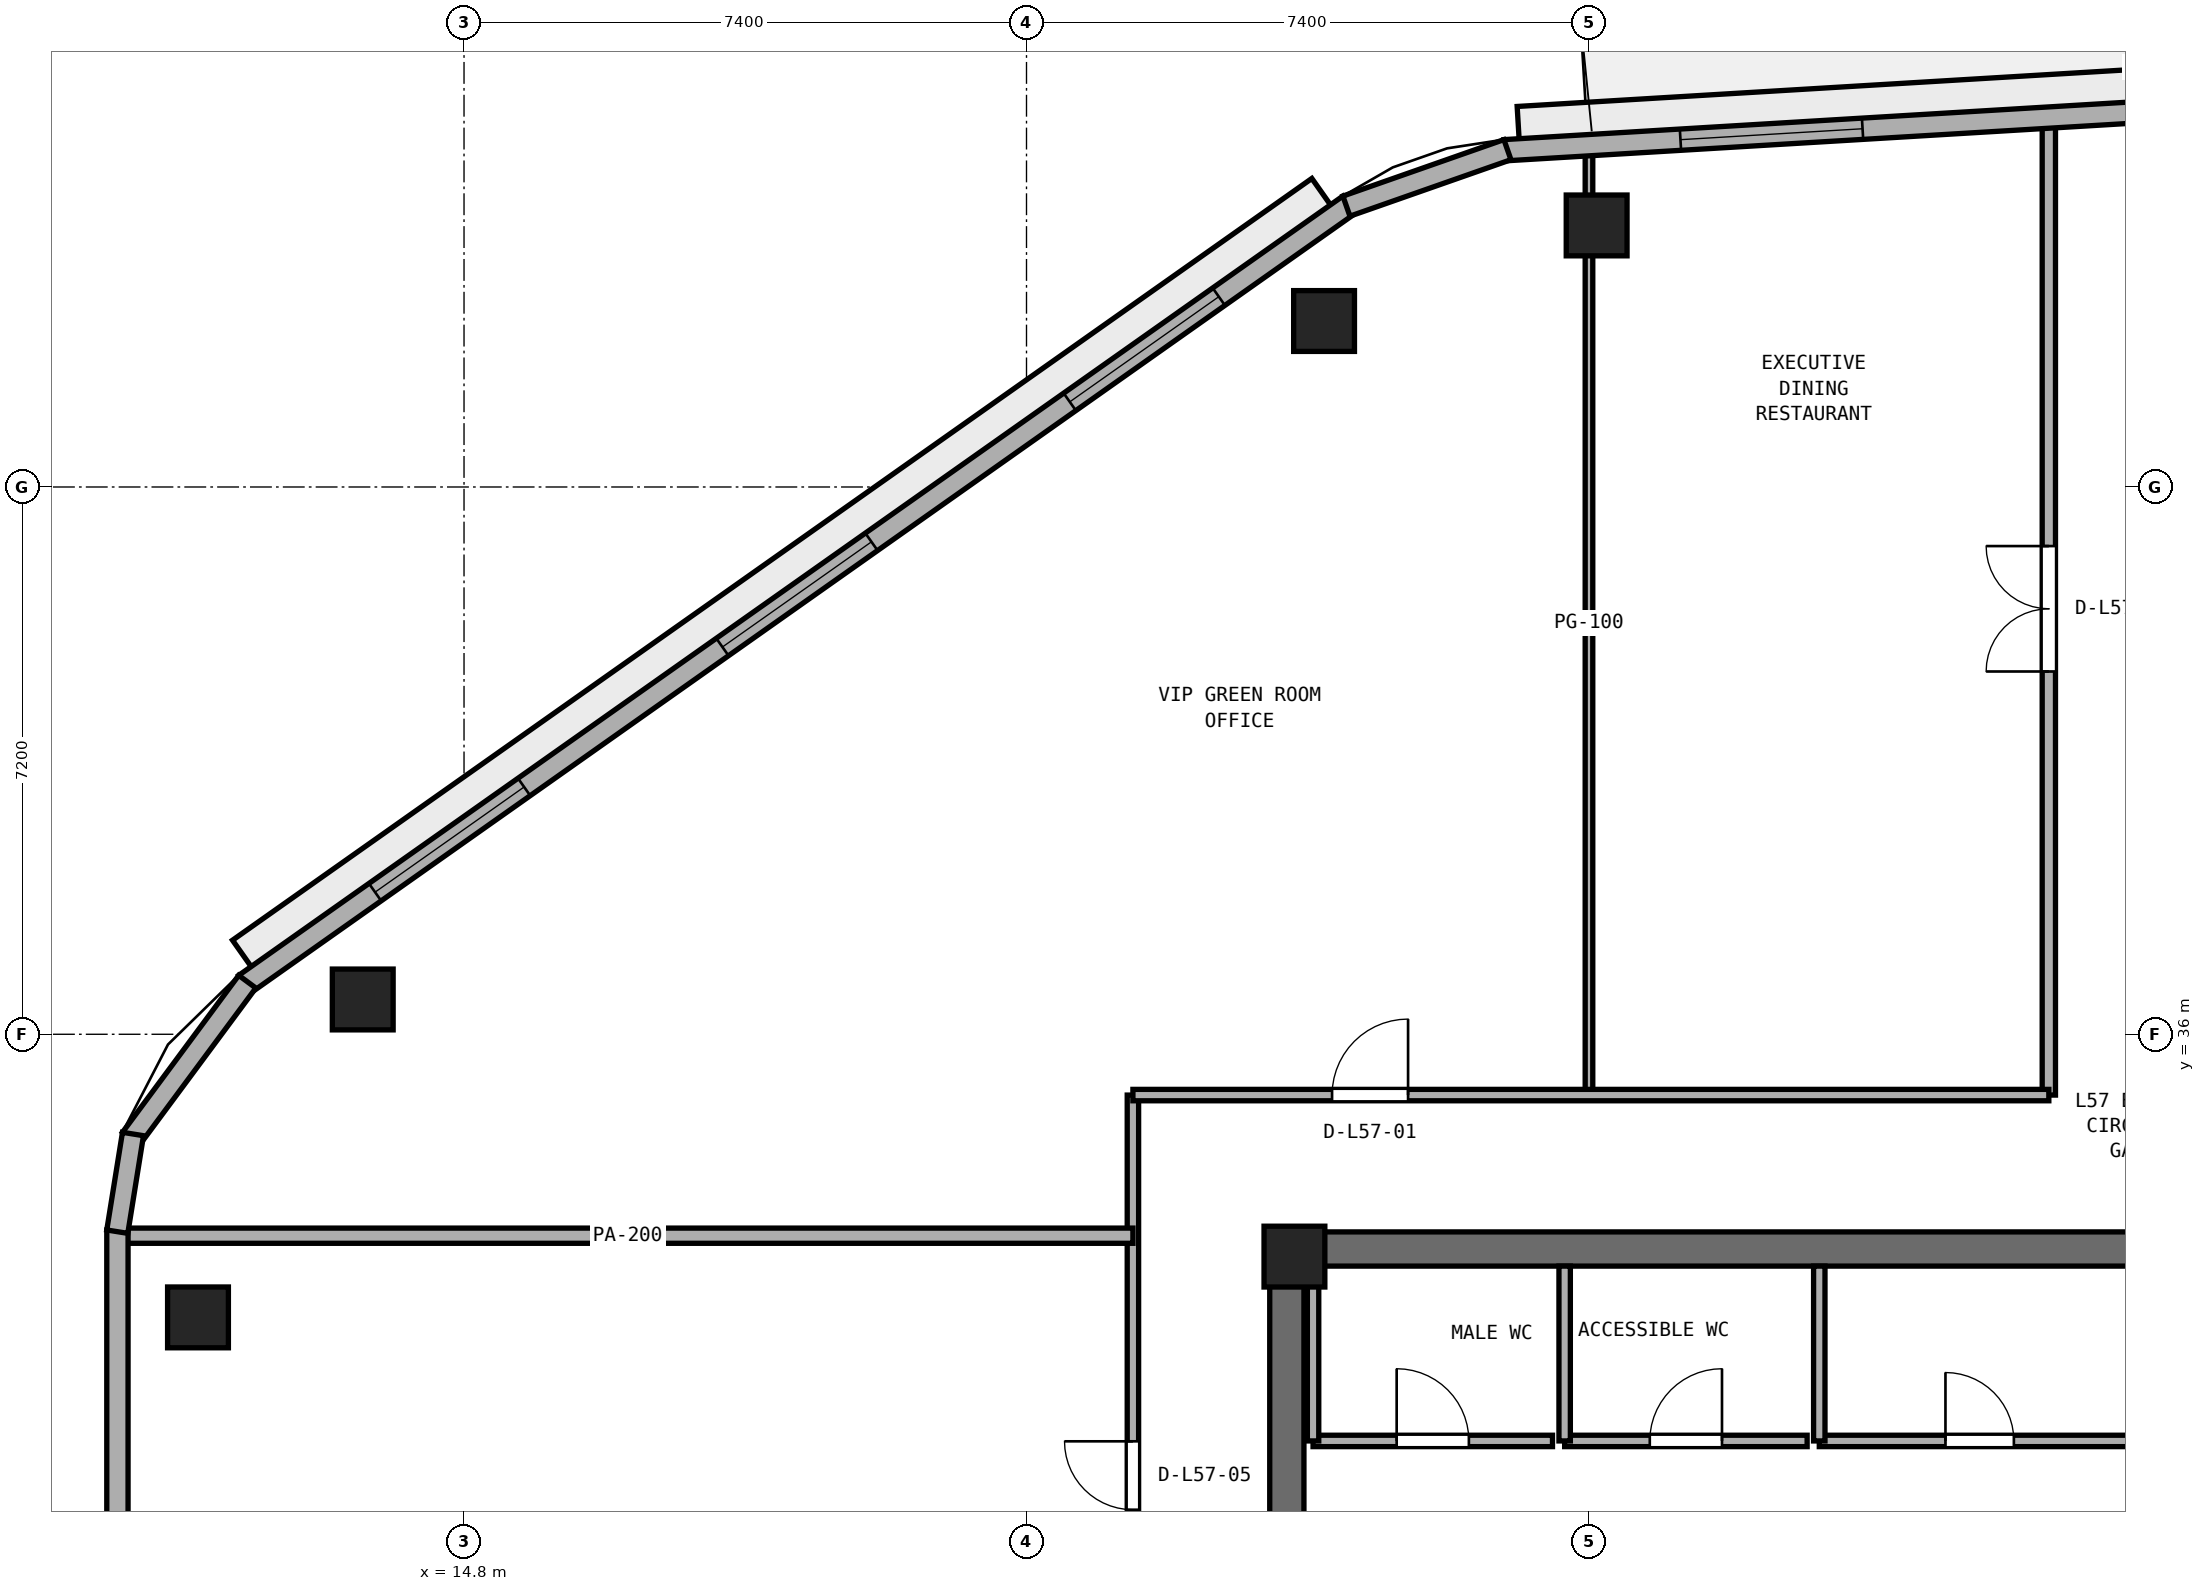
"""IFC4 building model, lengths in metres.
Left out: names, types, materials, properties, quantities, classifications, styles, units other than length and angle.
Written with IfcOpenShell. Run it as: python <this file> out.ifc"""

import sys

from ifc_helpers import new_model, si_unit, direction, frame, frame_2d, origin, origin_2d, place, context, subcontext, project, spatial, rectangle, extrude, element, fill, save


model = new_model("IFC4")
c1 = context("Model", 3, precision=1e-05, world=origin(), true_north=direction((0.0, 1.0)))
c2 = subcontext(c1, "Body", "Model", "MODEL_VIEW")
j1 = project(units=[si_unit("LENGTHUNIT", "METRE"), si_unit("PLANEANGLEUNIT", "RADIAN")], contexts=[c1])
p1 = place(None, origin())
s1 = spatial("IfcSite", under=j1, at=p1, CompositionType="ELEMENT")
p2 = place(p1, origin())
s2 = spatial("IfcBuilding", under=s1, at=p2, CompositionType="ELEMENT")
p3 = place(p2, frame((0.0, 0.0, 225.0)))
s3 = spatial("IfcBuildingStorey", under=s2, at=p3, CompositionType="ELEMENT", Elevation=225.0)
p4 = place(p3, frame((25.4, 33.175, 0.0), z_axis=(0.0, 0.0, 1.0), x_axis=(1.0, 0.0, 0.0)))
e1 = element("IfcWall", 1, at=p4, inside=s3, PredefinedType="SHEAR", context=c2, shape_type="SweptSolid", body=[
    extrude(rectangle(XDim=23.2, YDim=0.45, at=frame_2d((11.6, 0.0))), origin(), (0.0, 0.0, 1.0), 3.51),
])
p5 = place(p3, frame((25.625, 17.45, 0.0), z_axis=(0.0, 0.0, 1.0), x_axis=(0.0, 1.0, 0.0)))
e2 = element("IfcWall", 2, at=p5, inside=s3, PredefinedType="SHEAR", context=c2, shape_type="SweptSolid", body=[
    extrude(rectangle(XDim=15.5, YDim=0.45, at=frame_2d((7.75, 0.0))), origin(), (0.0, 0.0, 1.0), 3.51),
])
p6 = place(p5, frame((7.0, 0.0, 0.0)))
e3 = element("IfcOpeningElement", 3, at=p6, cuts=e2, PredefinedType="OPENING", context=c2, shape_type="SweptSolid", body=[
    extrude(rectangle(XDim=1.5, YDim=2.15, at=frame_2d((0.75, 1.075))), frame((0.0, 0.235, 0.0), z_axis=(0.0, -1.0, 0.0), x_axis=(1.0, 0.0, 0.0)), (0.0, 0.0, 1.0), 0.47),
])
p7 = place(p3, frame((25.725, 33.075, 0.0), z_axis=(0.0, 0.0, 1.0), x_axis=(1.0, 0.0, 0.0)))
e4 = element("IfcColumn", 4, at=p7, inside=s3, PredefinedType="PILASTER", context=c2, shape_type="SweptSolid", body=[
    extrude(rectangle(XDim=0.8, YDim=0.8, at=origin_2d()), origin(), (0.0, 0.0, 1.0), 3.8),
])
for number, where, z_axis, x_axis in (
    (5, (29.701, 46.641, 0.0), (0.0, 0.0, 1.0), (1.0, 0.0, 0.0)),
    (6, (26.115, 45.384, 0.0), (0.0, 0.0, 1.0), (1.0, 0.0, 0.0)),
    (7, (13.467, 36.458, 0.0), (0.0, 0.0, 1.0), (1.0, 0.0, 0.0)),
    (8, (11.3, 32.275, 0.0), (0.0, 0.0, 1.0), (1.0, 0.0, 0.0)),
):
    element("IfcColumn", number, at=place(p3, frame(where, z_axis=z_axis, x_axis=x_axis)), inside=s3, PredefinedType="COLUMN", context=c2, shape_type="SweptSolid", body=[
        extrude(rectangle(XDim=0.8, YDim=0.8, at=origin_2d()), origin(), (0.0, 0.0, 1.0), 3.8),
    ])
p8 = place(p3, frame((25.97, 30.65, 0.0), z_axis=(0.0, 0.0, 1.0), x_axis=(1.0, 0.0, 0.0)))
e9 = element("IfcWall", 9, at=p8, inside=s3, PredefinedType="PARTITIONING", context=c2, shape_type="SweptSolid", body=[
    extrude(rectangle(XDim=3.15, YDim=0.15, at=frame_2d((1.575, 0.0))), origin(), (0.0, 0.0, 1.0), 3.51),
])
p9 = place(p8, frame((1.1, 0.0, 0.0)))
e10 = element("IfcOpeningElement", 10, at=p9, cuts=e9, PredefinedType="OPENING", context=c2, shape_type="SweptSolid", body=[
    extrude(rectangle(XDim=0.95, YDim=2.1, at=frame_2d((0.475, 1.05))), frame((0.0, 0.085, 0.0), z_axis=(0.0, -1.0, 0.0), x_axis=(1.0, 0.0, 0.0)), (0.0, 0.0, 1.0), 0.17),
])
p10 = place(p3, frame((25.97, 30.65, 0.0), z_axis=(0.0, 0.0, 1.0), x_axis=(0.0, 1.0, 0.0)))
e11 = element("IfcWall", 11, at=p10, inside=s3, PredefinedType="PARTITIONING", context=c2, shape_type="SweptSolid", body=[
    extrude(rectangle(XDim=2.3, YDim=0.15, at=frame_2d((1.15, 0.0))), origin(), (0.0, 0.0, 1.0), 2.61),
])
p11 = place(p3, frame((29.28, 30.65, 0.0), z_axis=(0.0, 0.0, 1.0), x_axis=(1.0, 0.0, 0.0)))
e12 = element("IfcWall", 12, at=p11, inside=s3, PredefinedType="PARTITIONING", context=c2, shape_type="SweptSolid", body=[
    extrude(rectangle(XDim=3.19, YDim=0.15, at=frame_2d((1.595, 0.0))), origin(), (0.0, 0.0, 1.0), 3.51),
])
p12 = place(p11, frame((1.12, 0.0, 0.0)))
e13 = element("IfcOpeningElement", 13, at=p12, cuts=e12, PredefinedType="OPENING", context=c2, shape_type="SweptSolid", body=[
    extrude(rectangle(XDim=0.95, YDim=2.1, at=frame_2d((0.475, 1.05))), frame((0.0, 0.085, 0.0), z_axis=(0.0, -1.0, 0.0), x_axis=(1.0, 0.0, 0.0)), (0.0, 0.0, 1.0), 0.17),
])
p13 = place(p3, frame((29.28, 30.65, 0.0), z_axis=(0.0, 0.0, 1.0), x_axis=(0.0, 1.0, 0.0)))
e14 = element("IfcWall", 14, at=p13, inside=s3, PredefinedType="PARTITIONING", context=c2, shape_type="SweptSolid", body=[
    extrude(rectangle(XDim=2.3, YDim=0.15, at=frame_2d((1.15, 0.0))), origin(), (0.0, 0.0, 1.0), 3.51),
])
p14 = place(p3, frame((32.63, 30.65, 0.0), z_axis=(0.0, 0.0, 1.0), x_axis=(1.0, 0.0, 0.0)))
e15 = element("IfcWall", 15, at=p14, inside=s3, PredefinedType="PARTITIONING", context=c2, shape_type="SweptSolid", body=[
    extrude(rectangle(XDim=4.22, YDim=0.15, at=frame_2d((2.11, 0.0))), origin(), (0.0, 0.0, 1.0), 3.51),
])
p15 = place(p14, frame((1.66, 0.0, 0.0)))
e16 = element("IfcOpeningElement", 16, at=p15, cuts=e15, PredefinedType="OPENING", context=c2, shape_type="SweptSolid", body=[
    extrude(rectangle(XDim=0.9, YDim=2.1, at=frame_2d((0.45, 1.05))), frame((0.0, 0.085, 0.0), z_axis=(0.0, -1.0, 0.0), x_axis=(1.0, 0.0, 0.0)), (0.0, 0.0, 1.0), 0.17),
])
p16 = place(p3, frame((32.63, 30.65, 0.0), z_axis=(0.0, 0.0, 1.0), x_axis=(0.0, 1.0, 0.0)))
e17 = element("IfcWall", 17, at=p16, inside=s3, PredefinedType="PARTITIONING", context=c2, shape_type="SweptSolid", body=[
    extrude(rectangle(XDim=2.3, YDim=0.15, at=frame_2d((1.15, 0.0))), origin(), (0.0, 0.0, 1.0), 3.51),
])
p17 = place(p3, frame((35.65, 35.2, 0.0), z_axis=(0.0, 0.0, 1.0), x_axis=(0.0, 1.0, 0.0)))
e18 = element("IfcWall", 18, at=p17, inside=s3, PredefinedType="PARTITIONING", context=c2, shape_type="SweptSolid", body=[
    extrude(rectangle(XDim=12.795, YDim=0.175, at=frame_2d((6.398, 0.0))), origin(), (0.0, 0.0, 1.0), 3.51),
])
p18 = place(p17, frame((5.573, 0.0, 0.0)))
e19 = element("IfcOpeningElement", 19, at=p18, cuts=e18, PredefinedType="OPENING", context=c2, shape_type="SweptSolid", body=[
    extrude(rectangle(XDim=1.65, YDim=2.15, at=frame_2d((0.825, 1.075))), frame((0.0, 0.097, 0.0), z_axis=(0.0, -1.0, 0.0), x_axis=(1.0, 0.0, 0.0)), (0.0, 0.0, 1.0), 0.195),
])
p19 = place(p3, frame((29.6, 35.2, 0.0), z_axis=(0.0, 0.0, 1.0), x_axis=(0.0, 1.0, 0.0)))
e20 = element("IfcWall", 20, at=p19, inside=s3, PredefinedType="PARTITIONING", context=c2, shape_type="SweptSolid", body=[
    extrude(rectangle(XDim=12.432, YDim=0.1, at=frame_2d((6.216, 0.0))), origin(), (0.0, 0.0, 1.0), 2.893),
])
p20 = place(p3, frame((23.6, 26.8, 0.0), z_axis=(0.0, 0.0, 1.0), x_axis=(0.0, 1.0, 0.0)))
e21 = element("IfcWall", 21, at=p20, inside=s3, PredefinedType="PARTITIONING", context=c2, shape_type="SweptSolid", body=[
    extrude(rectangle(XDim=8.4, YDim=0.15, at=frame_2d((4.2, 0.0))), origin(), (0.0, 0.0, 1.0), 3.51),
])
p21 = place(p20, frame((2.945, 0.0, 0.0)))
e22 = element("IfcOpeningElement", 22, at=p21, cuts=e21, PredefinedType="OPENING", context=c2, shape_type="SweptSolid", body=[
    extrude(rectangle(XDim=0.9, YDim=2.1, at=frame_2d((0.45, 1.05))), frame((0.0, 0.085, 0.0), z_axis=(0.0, -1.0, 0.0), x_axis=(1.0, 0.0, 0.0)), (0.0, 0.0, 1.0), 0.17),
])
p22 = place(p3, frame((10.305, 33.35, 0.0), z_axis=(0.0, 0.0, 1.0), x_axis=(1.0, 0.0, 0.0)))
e23 = element("IfcWall", 23, at=p22, inside=s3, PredefinedType="PARTITIONING", context=c2, shape_type="SweptSolid", body=[
    extrude(rectangle(XDim=13.295, YDim=0.2, at=frame_2d((6.647, 0.0))), origin(), (0.0, 0.0, 1.0), 3.51),
])
p23 = place(p3, frame((23.6, 35.2, 0.0), z_axis=(0.0, 0.0, 1.0), x_axis=(1.0, 0.0, 0.0)))
e24 = element("IfcWall", 24, at=p23, inside=s3, PredefinedType="PARTITIONING", context=c2, shape_type="SweptSolid", body=[
    extrude(rectangle(XDim=12.05, YDim=0.15, at=frame_2d((6.025, 0.0))), origin(), (0.0, 0.0, 1.0), 3.51),
])
p24 = place(p23, frame((2.62, 0.0, 0.0)))
e25 = element("IfcOpeningElement", 25, at=p24, cuts=e24, PredefinedType="OPENING", context=c2, shape_type="SweptSolid", body=[
    extrude(rectangle(XDim=1.0, YDim=2.12, at=frame_2d((0.5, 1.06))), frame((0.0, 0.085, 0.0), z_axis=(0.0, -1.0, 0.0), x_axis=(1.0, 0.0, 0.0)), (0.0, 0.0, 1.0), 0.17),
])
p25 = place(p3, frame((47.566, 48.775, 0.0), z_axis=(0.0, 0.0, 1.0), x_axis=(-0.998202767485, -0.059926913695, 0.0)))
e26 = element("IfcWall", 26, at=p25, inside=s3, PredefinedType="STANDARD", context=c2, shape_type="SweptSolid", body=[
    extrude(rectangle(XDim=19.111, YDim=0.28, at=frame_2d((9.556, 0.0))), origin(), (0.0, 0.0, 1.0), 3.51),
])
p26 = place(p25, frame((9.656, 0.0, 0.0)))
e27 = element("IfcOpeningElement", 27, at=p26, cuts=e26, PredefinedType="OPENING", context=c2, shape_type="SweptSolid", body=[
    extrude(rectangle(XDim=1.1, YDim=2.2, at=frame_2d((0.55, 1.1))), frame((0.0, 0.15, 0.0), z_axis=(0.0, -1.0, 0.0), x_axis=(1.0, 0.0, 0.0)), (0.0, 0.0, 1.0), 0.3),
])
p27 = place(p25, frame((2.319, 0.0, 0.9)))
e28 = element("IfcOpeningElement", 28, at=p27, cuts=e26, PredefinedType="OPENING", context=c2, shape_type="SweptSolid", body=[
    extrude(rectangle(XDim=2.4, YDim=1.75, at=frame_2d((1.2, 0.875))), frame((0.0, 0.15, 0.0), z_axis=(0.0, -1.0, 0.0), x_axis=(1.0, 0.0, 0.0)), (0.0, 0.0, 1.0), 0.3),
])
p28 = place(p25, frame((14.392, 0.0, 0.9)))
e29 = element("IfcOpeningElement", 29, at=p28, cuts=e26, PredefinedType="OPENING", context=c2, shape_type="SweptSolid", body=[
    extrude(rectangle(XDim=2.4, YDim=1.75, at=frame_2d((1.2, 0.875))), frame((0.0, 0.15, 0.0), z_axis=(0.0, -1.0, 0.0), x_axis=(1.0, 0.0, 0.0)), (0.0, 0.0, 1.0), 0.3),
])
p29 = place(p3, frame((26.443, 46.913, 0.0), z_axis=(0.0, 0.0, 1.0), x_axis=(-0.817024179766, -0.576603407619, 0.0)))
e30 = element("IfcWall", 30, at=p29, inside=s3, PredefinedType="STANDARD", context=c2, shape_type="SweptSolid", body=[
    extrude(rectangle(XDim=17.78, YDim=0.28, at=frame_2d((8.89, 0.0))), origin(), (0.0, 0.0, 1.0), 3.51),
])
p30 = place(p29, frame((2.097, 0.0, 0.9)))
e31 = element("IfcOpeningElement", 31, at=p30, cuts=e30, PredefinedType="OPENING", context=c2, shape_type="SweptSolid", body=[
    extrude(rectangle(XDim=2.4, YDim=1.75, at=frame_2d((1.2, 0.875))), frame((0.0, 0.15, 0.0), z_axis=(0.0, -1.0, 0.0), x_axis=(1.0, 0.0, 0.0)), (0.0, 0.0, 1.0), 0.3),
])
p31 = place(p29, frame((7.69, 0.0, 0.9)))
e32 = element("IfcOpeningElement", 32, at=p31, cuts=e30, PredefinedType="OPENING", context=c2, shape_type="SweptSolid", body=[
    extrude(rectangle(XDim=2.4, YDim=1.75, at=frame_2d((1.2, 0.875))), frame((0.0, 0.15, 0.0), z_axis=(0.0, -1.0, 0.0), x_axis=(1.0, 0.0, 0.0)), (0.0, 0.0, 1.0), 0.3),
])
p32 = place(p29, frame((13.283, 0.0, 0.9)))
e33 = element("IfcOpeningElement", 33, at=p32, cuts=e30, PredefinedType="OPENING", context=c2, shape_type="SweptSolid", body=[
    extrude(rectangle(XDim=2.4, YDim=1.75, at=frame_2d((1.2, 0.875))), frame((0.0, 0.15, 0.0), z_axis=(0.0, -1.0, 0.0), x_axis=(1.0, 0.0, 0.0)), (0.0, 0.0, 1.0), 0.3),
])
p33 = place(p3, frame((10.24, 33.425, 0.0), z_axis=(0.0, 0.0, 1.0), x_axis=(0.0, -1.0, 0.0)))
e34 = element("IfcWall", 34, at=p33, inside=s3, PredefinedType="STANDARD", context=c2, shape_type="SweptSolid", body=[
    extrude(rectangle(XDim=5.155, YDim=0.28, at=frame_2d((2.578, 0.0))), origin(), (0.0, 0.0, 1.0), 3.51),
])
p34 = place(p3, frame((28.527, 47.638, 0.0), z_axis=(0.0, 0.0, 1.0), x_axis=(-0.943686979207, -0.330839667022, 0.0)))
e35 = element("IfcWall", 35, at=p34, inside=s3, PredefinedType="STANDARD", context=c2, shape_type="SweptSolid", body=[
    extrude(rectangle(XDim=2.245, YDim=0.28, at=frame_2d((1.123, 0.0))), origin(), (0.0, 0.0, 1.0), 3.51),
])
p35 = place(p3, frame((11.948, 36.692, 0.0), z_axis=(0.0, 0.0, 1.0), x_axis=(-0.595170751493, -0.803599263668, 0.0)))
e36 = element("IfcWall", 36, at=p35, inside=s3, PredefinedType="STANDARD", context=c2, shape_type="SweptSolid", body=[
    extrude(rectangle(XDim=2.57, YDim=0.28, at=frame_2d((1.285, 0.0))), origin(), (0.0, 0.0, 1.0), 3.51),
])
p36 = place(p3, frame((10.445, 34.688, 0.0), z_axis=(0.0, 0.0, 1.0), x_axis=(-0.158524605336, -0.987355027081, 0.0)))
e37 = element("IfcWall", 37, at=p36, inside=s3, PredefinedType="STANDARD", context=c2, shape_type="SweptSolid", body=[
    extrude(rectangle(XDim=1.301, YDim=0.28, at=frame_2d((0.651, 0.0))), origin(), (0.0, 0.0, 1.0), 3.51),
])
p37 = place(p9, origin())
e38 = element("IfcDoor", 38, at=p37, inside=s3, OperationType="SINGLE_SWING_LEFT", PredefinedType="DOOR", context=c2, shape_type="SweptSolid", body=[
    extrude(rectangle(XDim=0.95, YDim=2.1, at=frame_2d((0.475, 1.05))), frame((0.0, 0.025, 0.0), z_axis=(0.0, -1.0, 0.0), x_axis=(1.0, 0.0, 0.0)), (0.0, 0.0, 1.0), 0.05),
])
fill(e10, e38)
p38 = place(p12, origin())
e39 = element("IfcDoor", 39, at=p38, inside=s3, OperationType="SINGLE_SWING_RIGHT", PredefinedType="DOOR", context=c2, shape_type="SweptSolid", body=[
    extrude(rectangle(XDim=0.95, YDim=2.1, at=frame_2d((0.475, 1.05))), frame((0.0, 0.025, 0.0), z_axis=(0.0, -1.0, 0.0), x_axis=(1.0, 0.0, 0.0)), (0.0, 0.0, 1.0), 0.05),
])
fill(e13, e39)
p39 = place(p15, origin())
e40 = element("IfcDoor", 40, at=p39, inside=s3, OperationType="SINGLE_SWING_LEFT", PredefinedType="DOOR", context=c2, shape_type="SweptSolid", body=[
    extrude(rectangle(XDim=0.9, YDim=2.1, at=frame_2d((0.45, 1.05))), frame((0.0, 0.025, 0.0), z_axis=(0.0, -1.0, 0.0), x_axis=(1.0, 0.0, 0.0)), (0.0, 0.0, 1.0), 0.05),
])
fill(e16, e40)
p40 = place(p24, origin())
e41 = element("IfcDoor", 41, at=p40, inside=s3, OperationType="SINGLE_SWING_RIGHT", PredefinedType="DOOR", context=c2, shape_type="SweptSolid", body=[
    extrude(rectangle(XDim=1.0, YDim=2.12, at=frame_2d((0.5, 1.06))), frame((0.0, 0.025, 0.0), z_axis=(0.0, -1.0, 0.0), x_axis=(1.0, 0.0, 0.0)), (0.0, 0.0, 1.0), 0.05),
])
fill(e25, e41)
p41 = place(p18, origin())
e42 = element("IfcDoor", 42, at=p41, inside=s3, OperationType="DOUBLE_DOOR_SINGLE_SWING", PredefinedType="DOOR", context=c2, shape_type="SweptSolid", body=[
    extrude(rectangle(XDim=1.65, YDim=2.15, at=frame_2d((0.825, 1.075))), frame((0.0, 0.025, 0.0), z_axis=(0.0, -1.0, 0.0), x_axis=(1.0, 0.0, 0.0)), (0.0, 0.0, 1.0), 0.05),
])
fill(e19, e42)
p42 = place(p21, origin())
e43 = element("IfcDoor", 43, at=p42, inside=s3, OperationType="SINGLE_SWING_RIGHT", PredefinedType="DOOR", context=c2, shape_type="SweptSolid", body=[
    extrude(rectangle(XDim=0.9, YDim=2.1, at=frame_2d((0.45, 1.05))), frame((0.0, 0.025, 0.0), z_axis=(0.0, -1.0, 0.0), x_axis=(1.0, 0.0, 0.0)), (0.0, 0.0, 1.0), 0.05),
])
fill(e22, e43)
p43 = place(p28, origin())
e44 = element("IfcWindow", 44, at=p43, inside=s3, PartitioningType="SINGLE_PANEL", PredefinedType="WINDOW", context=c2, shape_type="SweptSolid", body=[
    extrude(rectangle(XDim=2.4, YDim=1.75, at=frame_2d((1.2, 0.875))), frame((0.0, 0.03, 0.0), z_axis=(0.0, -1.0, 0.0), x_axis=(1.0, 0.0, 0.0)), (0.0, 0.0, 1.0), 0.06),
])
fill(e29, e44)
p44 = place(p30, origin())
e45 = element("IfcWindow", 45, at=p44, inside=s3, PartitioningType="SINGLE_PANEL", PredefinedType="WINDOW", context=c2, shape_type="SweptSolid", body=[
    extrude(rectangle(XDim=2.4, YDim=1.75, at=frame_2d((1.2, 0.875))), frame((0.0, 0.03, 0.0), z_axis=(0.0, -1.0, 0.0), x_axis=(1.0, 0.0, 0.0)), (0.0, 0.0, 1.0), 0.06),
])
fill(e31, e45)
p45 = place(p31, origin())
e46 = element("IfcWindow", 46, at=p45, inside=s3, PartitioningType="SINGLE_PANEL", PredefinedType="WINDOW", context=c2, shape_type="SweptSolid", body=[
    extrude(rectangle(XDim=2.4, YDim=1.75, at=frame_2d((1.2, 0.875))), frame((0.0, 0.03, 0.0), z_axis=(0.0, -1.0, 0.0), x_axis=(1.0, 0.0, 0.0)), (0.0, 0.0, 1.0), 0.06),
])
fill(e32, e46)
p46 = place(p32, origin())
e47 = element("IfcWindow", 47, at=p46, inside=s3, PartitioningType="SINGLE_PANEL", PredefinedType="WINDOW", context=c2, shape_type="SweptSolid", body=[
    extrude(rectangle(XDim=2.4, YDim=1.75, at=frame_2d((1.2, 0.875))), frame((0.0, 0.03, 0.0), z_axis=(0.0, -1.0, 0.0), x_axis=(1.0, 0.0, 0.0)), (0.0, 0.0, 1.0), 0.06),
])
fill(e33, e47)
save(model, sys.argv[1])
